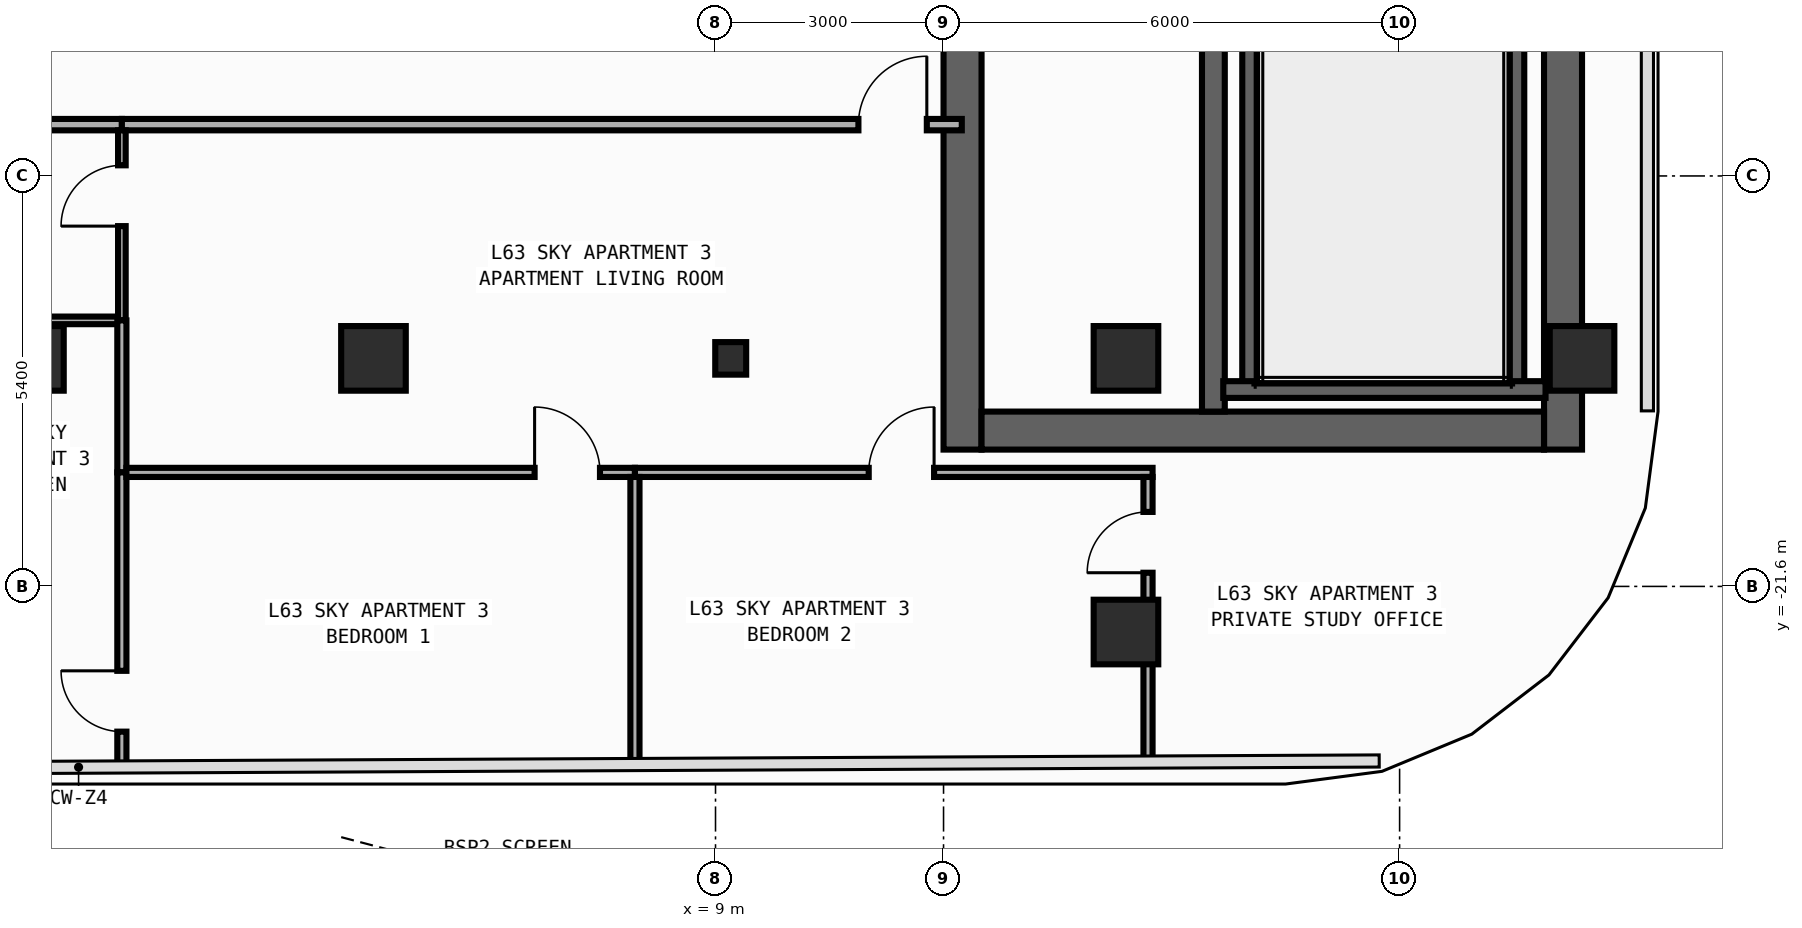
"""IFC4 building model, lengths in metres.
Left out: names, types, materials, properties, quantities, classifications, styles, units other than length and angle.
Written with IfcOpenShell. Run it as: python <this file> out.ifc"""

import sys

from ifc_helpers import new_model, si_unit, direction, frame, frame_2d, origin, origin_2d, place, context, subcontext, project, spatial, rectangle, i_section, extrude, element, fill, save


model = new_model("IFC4")
c1 = context("Model", 3, precision=1e-05, world=origin(), true_north=direction((0.0, 1.0)))
c2 = subcontext(c1, "Body", "Model", "MODEL_VIEW")
j1 = project(units=[si_unit("LENGTHUNIT", "METRE"), si_unit("PLANEANGLEUNIT", "RADIAN")], contexts=[c1])
p1 = place(None, origin())
s1 = spatial("IfcSite", under=j1, at=p1, CompositionType="ELEMENT")
p2 = place(p1, origin())
s2 = spatial("IfcBuilding", under=s1, at=p2, CompositionType="ELEMENT")
p3 = place(p2, frame((0.0, 0.0, 265.6)))
s3 = spatial("IfcBuildingStorey", under=s2, at=p3, CompositionType="ELEMENT", Elevation=265.6)
p4 = place(p3, frame((12.25, -19.8, 0.0), z_axis=(0.0, 0.0, 1.0), x_axis=(0.0, 1.0, 0.0)))
e1 = element("IfcWall", 1, at=p4, inside=s3, PredefinedType="SHEAR", context=c2, shape_type="SweptSolid", body=[
    extrude(rectangle(XDim=27.0, YDim=0.5, at=frame_2d((13.5, 0.0))), origin(), (0.0, 0.0, 1.0), 3.34),
])
p5 = place(p4, frame((23.05, 0.0, 0.0)))
e2 = element("IfcOpeningElement", 2, at=p5, cuts=e1, PredefinedType="OPENING", context=c2, shape_type="SweptSolid", body=[
    extrude(rectangle(XDim=1.1, YDim=2.2, at=frame_2d((0.55, 1.1))), frame((0.0, 0.26, 0.0), z_axis=(0.0, -1.0, 0.0), x_axis=(1.0, 0.0, 0.0)), (0.0, 0.0, 1.0), 0.52),
])
p6 = place(p4, frame((19.85, 0.0, 0.0)))
e3 = element("IfcOpeningElement", 3, at=p6, cuts=e1, PredefinedType="OPENING", context=c2, shape_type="SweptSolid", body=[
    extrude(rectangle(XDim=1.1, YDim=2.2, at=frame_2d((0.55, 1.1))), frame((0.0, 0.26, 0.0), z_axis=(0.0, -1.0, 0.0), x_axis=(1.0, 0.0, 0.0)), (0.0, 0.0, 1.0), 0.52),
])
p7 = place(p4, frame((16.65, 0.0, 0.0)))
e4 = element("IfcOpeningElement", 4, at=p7, cuts=e1, PredefinedType="OPENING", context=c2, shape_type="SweptSolid", body=[
    extrude(rectangle(XDim=1.1, YDim=2.2, at=frame_2d((0.55, 1.1))), frame((0.0, 0.26, 0.0), z_axis=(0.0, -1.0, 0.0), x_axis=(1.0, 0.0, 0.0)), (0.0, 0.0, 1.0), 0.52),
])
p8 = place(p4, frame((10.175, 0.0, 0.0)))
e5 = element("IfcOpeningElement", 5, at=p8, cuts=e1, PredefinedType="OPENING", context=c2, shape_type="SweptSolid", body=[
    extrude(rectangle(XDim=0.85, YDim=2.1, at=frame_2d((0.425, 1.05))), frame((0.0, 0.26, 0.0), z_axis=(0.0, -1.0, 0.0), x_axis=(1.0, 0.0, 0.0)), (0.0, 0.0, 1.0), 0.52),
])
p9 = place(p4, frame((12.725, 0.0, 0.0)))
e6 = element("IfcOpeningElement", 6, at=p9, cuts=e1, PredefinedType="OPENING", context=c2, shape_type="SweptSolid", body=[
    extrude(rectangle(XDim=1.15, YDim=2.2, at=frame_2d((0.575, 1.1))), frame((0.0, 0.26, 0.0), z_axis=(0.0, -1.0, 0.0), x_axis=(1.0, 0.0, 0.0)), (0.0, 0.0, 1.0), 0.52),
])
p10 = place(p4, frame((25.125, 0.0, 0.0)))
e7 = element("IfcOpeningElement", 7, at=p10, cuts=e1, PredefinedType="OPENING", context=c2, shape_type="SweptSolid", body=[
    extrude(rectangle(XDim=0.85, YDim=2.1, at=frame_2d((0.425, 1.05))), frame((0.0, 0.26, 0.0), z_axis=(0.0, -1.0, 0.0), x_axis=(1.0, 0.0, 0.0)), (0.0, 0.0, 1.0), 0.52),
])
p11 = place(p3, frame((20.15, -19.8, 0.0), z_axis=(0.0, 0.0, 1.0), x_axis=(0.0, 1.0, 0.0)))
e8 = element("IfcWall", 8, at=p11, inside=s3, PredefinedType="SHEAR", context=c2, shape_type="SweptSolid", body=[
    extrude(rectangle(XDim=27.0, YDim=0.5, at=frame_2d((13.5, 0.0))), origin(), (0.0, 0.0, 1.0), 3.34),
])
p12 = place(p3, frame((12.5, -19.55, 0.0), z_axis=(0.0, 0.0, 1.0), x_axis=(1.0, 0.0, 0.0)))
e9 = element("IfcWall", 9, at=p12, inside=s3, PredefinedType="SHEAR", context=c2, shape_type="SweptSolid", body=[
    extrude(rectangle(XDim=7.4, YDim=0.5, at=frame_2d((3.7, 0.0))), origin(), (0.0, 0.0, 1.0), 3.34),
])
p13 = place(p3, frame((15.55, -19.3, 0.0), z_axis=(0.0, 0.0, 1.0), x_axis=(0.0, 1.0, 0.0)))
e10 = element("IfcWall", 10, at=p13, inside=s3, PredefinedType="SHEAR", context=c2, shape_type="SweptSolid", body=[
    extrude(rectangle(XDim=26.0, YDim=0.3, at=frame_2d((13.0, 0.0))), origin(), (0.0, 0.0, 1.0), 3.34),
])
p14 = place(p13, frame((12.225, 0.0, 0.0)))
e11 = element("IfcOpeningElement", 11, at=p14, cuts=e10, PredefinedType="OPENING", context=c2, shape_type="SweptSolid", body=[
    extrude(rectangle(XDim=1.15, YDim=2.2, at=frame_2d((0.575, 1.1))), frame((0.0, 0.16, 0.0), z_axis=(0.0, -1.0, 0.0), x_axis=(1.0, 0.0, 0.0)), (0.0, 0.0, 1.0), 0.32),
])
p15 = place(p13, frame((24.625, 0.0, 0.0)))
e12 = element("IfcOpeningElement", 12, at=p15, cuts=e10, PredefinedType="OPENING", context=c2, shape_type="SweptSolid", body=[
    extrude(rectangle(XDim=0.85, YDim=2.1, at=frame_2d((0.425, 1.05))), frame((0.0, 0.16, 0.0), z_axis=(0.0, -1.0, 0.0), x_axis=(1.0, 0.0, 0.0)), (0.0, 0.0, 1.0), 0.32),
])
for number, where, z_axis, x_axis in (
    (13, (16.04, -19.01, 0.0), (0.0, 0.0, 1.0), (0.0, 1.0, 0.0)),
    (14, (19.53, -19.01, 0.0), (0.0, 0.0, 1.0), (0.0, 1.0, 0.0)),
):
    element("IfcWall", number, at=place(p3, frame(where, z_axis=z_axis, x_axis=x_axis)), inside=s3, PredefinedType="SHEAR", context=c2, shape_type="SweptSolid", body=[
        extrude(rectangle(XDim=11.42, YDim=0.22, at=frame_2d((5.71, 0.0))), origin(), (0.0, 0.0, 1.0), 3.34),
    ])
p16 = place(p3, frame((15.68, -19.01, 0.0), z_axis=(0.0, 0.0, 1.0), x_axis=(1.0, 0.0, 0.0)))
e15 = element("IfcWall", 15, at=p16, inside=s3, PredefinedType="SHEAR", context=c2, shape_type="SweptSolid", body=[
    extrude(rectangle(XDim=4.24, YDim=0.22, at=frame_2d((2.12, 0.0))), origin(), (0.0, 0.0, 1.0), 3.34),
])
p17 = place(p3, frame((9.2, -18.6, 0.0), z_axis=(0.0, 0.0, 1.0), x_axis=(1.0, 0.0, 0.0)))
e16 = element("IfcColumn", 16, at=p17, inside=s3, PredefinedType="COLUMN", context=c2, shape_type="SweptSolid", body=[
    extrude(i_section(OverallWidth=0.407, OverallDepth=0.428, WebThickness=0.02, FlangeThickness=0.035, FilletRadius=0.022, at=origin_2d()), origin(), (0.0, 0.0, 1.0), 3.6),
])
for number, where, z_axis, x_axis in (
    (17, (20.4, -18.6, 0.0), (0.0, 0.0, 1.0), (1.0, 0.0, 0.0)),
    (18, (14.4, -18.6, 0.0), (0.0, 0.0, 1.0), (1.0, 0.0, 0.0)),
    (19, (0.0, -18.6, 0.0), (0.0, 0.0, 1.0), (1.0, 0.0, 0.0)),
    (20, (4.5, -18.6, 0.0), (0.0, 0.0, 1.0), (1.0, 0.0, 0.0)),
    (21, (14.4, -22.2, 0.0), (0.0, 0.0, 1.0), (1.0, 0.0, 0.0)),
):
    element("IfcColumn", number, at=place(p3, frame(where, z_axis=z_axis, x_axis=x_axis)), inside=s3, PredefinedType="COLUMN", context=c2, shape_type="SweptSolid", body=[
        extrude(rectangle(XDim=0.85, YDim=0.85, at=origin_2d()), origin(), (0.0, 0.0, 1.0), 3.6),
    ])
p18 = place(p3, frame((-1.4, -15.525, 0.0), z_axis=(0.0, 0.0, 1.0), x_axis=(1.0, 0.0, 0.0)))
e22 = element("IfcWall", 22, at=p18, inside=s3, PredefinedType="PARTITIONING", context=c2, shape_type="SweptSolid", body=[
    extrude(rectangle(XDim=2.59, YDim=0.15, at=frame_2d((1.295, 0.0))), origin(), (0.0, 0.0, 1.0), 3.34),
])
p19 = place(p3, frame((1.19, -15.525, 0.0), z_axis=(0.0, 0.0, 1.0), x_axis=(1.0, 0.0, 0.0)))
e23 = element("IfcWall", 23, at=p19, inside=s3, PredefinedType="PARTITIONING", context=c2, shape_type="SweptSolid", body=[
    extrude(rectangle(XDim=11.05, YDim=0.15, at=frame_2d((5.525, 0.0))), origin(), (0.0, 0.0, 1.0), 3.34),
])
p20 = place(p19, frame((9.69, 0.0, 0.0)))
e24 = element("IfcOpeningElement", 24, at=p20, cuts=e23, PredefinedType="OPENING", context=c2, shape_type="SweptSolid", body=[
    extrude(rectangle(XDim=0.9, YDim=2.15, at=frame_2d((0.45, 1.075))), frame((0.0, 0.085, 0.0), z_axis=(0.0, -1.0, 0.0), x_axis=(1.0, 0.0, 0.0)), (0.0, 0.0, 1.0), 0.17),
])
p21 = place(p3, frame((-1.33, -18.1, 0.0), z_axis=(0.0, 0.0, 1.0), x_axis=(1.0, 0.0, 0.0)))
e25 = element("IfcWall", 25, at=p21, inside=s3, PredefinedType="PARTITIONING", context=c2, shape_type="SweptSolid", body=[
    extrude(rectangle(XDim=2.47, YDim=0.1, at=frame_2d((1.235, 0.0))), origin(), (0.0, 0.0, 1.0), 3.34),
])
p22 = place(p3, frame((1.19, -18.1, 0.0), z_axis=(0.0, 0.0, 1.0), x_axis=(0.0, 1.0, 0.0)))
e26 = element("IfcWall", 26, at=p22, inside=s3, PredefinedType="PARTITIONING", context=c2, shape_type="SweptSolid", body=[
    extrude(rectangle(XDim=2.5, YDim=0.1, at=frame_2d((1.25, 0.0))), origin(), (0.0, 0.0, 1.0), 3.34),
])
p23 = place(p22, frame((1.24, 0.0, 0.0)))
e27 = element("IfcOpeningElement", 27, at=p23, cuts=e26, PredefinedType="OPENING", context=c2, shape_type="SweptSolid", body=[
    extrude(rectangle(XDim=0.8, YDim=2.1, at=frame_2d((0.4, 1.05))), frame((0.0, 0.06, 0.0), z_axis=(0.0, -1.0, 0.0), x_axis=(1.0, 0.0, 0.0)), (0.0, 0.0, 1.0), 0.12),
])
p24 = place(p3, frame((1.19, -20.1, 0.0), z_axis=(0.0, 0.0, 1.0), x_axis=(0.0, 1.0, 0.0)))
e28 = element("IfcWall", 28, at=p24, inside=s3, PredefinedType="PARTITIONING", context=c2, shape_type="SweptSolid", body=[
    extrude(rectangle(XDim=2.0, YDim=0.12, at=frame_2d((1.0, 0.0))), origin(), (0.0, 0.0, 1.0), 3.34),
])
p25 = place(p3, frame((1.19, -23.971, 0.0), z_axis=(0.0, 0.0, 1.0), x_axis=(0.0, 1.0, 0.0)))
e29 = element("IfcWall", 29, at=p25, inside=s3, PredefinedType="PARTITIONING", context=c2, shape_type="SweptSolid", body=[
    extrude(rectangle(XDim=3.871, YDim=0.12, at=frame_2d((1.935, 0.0))), origin(), (0.0, 0.0, 1.0), 3.34),
])
p26 = place(p25, frame((0.46, 0.0, 0.0)))
e30 = element("IfcOpeningElement", 30, at=p26, cuts=e29, PredefinedType="OPENING", context=c2, shape_type="SweptSolid", body=[
    extrude(rectangle(XDim=0.8, YDim=2.1, at=frame_2d((0.4, 1.05))), frame((0.0, 0.07, 0.0), z_axis=(0.0, -1.0, 0.0), x_axis=(1.0, 0.0, 0.0)), (0.0, 0.0, 1.0), 0.14),
])
p27 = place(p3, frame((1.25, -20.1, 0.0), z_axis=(0.0, 0.0, 1.0), x_axis=(1.0, 0.0, 0.0)))
e31 = element("IfcWall", 31, at=p27, inside=s3, PredefinedType="PARTITIONING", context=c2, shape_type="SweptSolid", body=[
    extrude(rectangle(XDim=6.69, YDim=0.12, at=frame_2d((3.345, 0.0))), origin(), (0.0, 0.0, 1.0), 3.34),
])
p28 = place(p27, frame((5.37, 0.0, 0.0)))
e32 = element("IfcOpeningElement", 32, at=p28, cuts=e31, PredefinedType="OPENING", context=c2, shape_type="SweptSolid", body=[
    extrude(rectangle(XDim=0.86, YDim=2.15, at=frame_2d((0.43, 1.075))), frame((0.0, 0.07, 0.0), z_axis=(0.0, -1.0, 0.0), x_axis=(1.0, 0.0, 0.0)), (0.0, 0.0, 1.0), 0.14),
])
p29 = place(p3, frame((7.94, -20.1, 0.0), z_axis=(0.0, 0.0, 1.0), x_axis=(1.0, 0.0, 0.0)))
e33 = element("IfcWall", 33, at=p29, inside=s3, PredefinedType="PARTITIONING", context=c2, shape_type="SweptSolid", body=[
    extrude(rectangle(XDim=6.81, YDim=0.12, at=frame_2d((3.405, 0.0))), origin(), (0.0, 0.0, 1.0), 3.34),
])
p30 = place(p29, frame((3.076, 0.0, 0.0)))
e34 = element("IfcOpeningElement", 34, at=p30, cuts=e33, PredefinedType="OPENING", context=c2, shape_type="SweptSolid", body=[
    extrude(rectangle(XDim=0.86, YDim=2.15, at=frame_2d((0.43, 1.075))), frame((0.0, 0.07, 0.0), z_axis=(0.0, -1.0, 0.0), x_axis=(1.0, 0.0, 0.0)), (0.0, 0.0, 1.0), 0.14),
])
p31 = place(p3, frame((14.69, -23.906, 0.0), z_axis=(0.0, 0.0, 1.0), x_axis=(0.0, 1.0, 0.0)))
e35 = element("IfcWall", 35, at=p31, inside=s3, PredefinedType="PARTITIONING", context=c2, shape_type="SweptSolid", body=[
    extrude(rectangle(XDim=3.746, YDim=0.12, at=frame_2d((1.873, 0.0))), origin(), (0.0, 0.0, 1.0), 2.44),
])
p32 = place(p31, frame((2.486, 0.0, 0.0)))
e36 = element("IfcOpeningElement", 36, at=p32, cuts=e35, PredefinedType="OPENING", context=c2, shape_type="SweptSolid", body=[
    extrude(rectangle(XDim=0.8, YDim=2.1, at=frame_2d((0.4, 1.05))), frame((0.0, 0.07, 0.0), z_axis=(0.0, -1.0, 0.0), x_axis=(1.0, 0.0, 0.0)), (0.0, 0.0, 1.0), 0.14),
])
p33 = place(p3, frame((7.94, -23.938, 0.0), z_axis=(0.0, 0.0, 1.0), x_axis=(0.0, 1.0, 0.0)))
e37 = element("IfcWall", 37, at=p33, inside=s3, PredefinedType="PARTITIONING", context=c2, shape_type="SweptSolid", body=[
    extrude(rectangle(XDim=3.779, YDim=0.12, at=frame_2d((1.889, 0.0))), origin(), (0.0, 0.0, 1.0), 3.34),
])
p34 = place(p20, origin())
e38 = element("IfcDoor", 38, at=p34, inside=s3, OperationType="SINGLE_SWING_RIGHT", PredefinedType="DOOR", context=c2, shape_type="SweptSolid", body=[
    extrude(rectangle(XDim=0.9, YDim=2.15, at=frame_2d((0.45, 1.075))), frame((0.0, 0.025, 0.0), z_axis=(0.0, -1.0, 0.0), x_axis=(1.0, 0.0, 0.0)), (0.0, 0.0, 1.0), 0.05),
])
fill(e24, e38)
p35 = place(p23, origin())
e39 = element("IfcDoor", 39, at=p35, inside=s3, OperationType="SINGLE_SWING_LEFT", PredefinedType="DOOR", context=c2, shape_type="SweptSolid", body=[
    extrude(rectangle(XDim=0.8, YDim=2.1, at=frame_2d((0.4, 1.05))), frame((0.0, 0.025, 0.0), z_axis=(0.0, -1.0, 0.0), x_axis=(1.0, 0.0, 0.0)), (0.0, 0.0, 1.0), 0.05),
])
fill(e27, e39)
p36 = place(p28, origin())
e40 = element("IfcDoor", 40, at=p36, inside=s3, OperationType="SINGLE_SWING_LEFT", PredefinedType="DOOR", context=c2, shape_type="SweptSolid", body=[
    extrude(rectangle(XDim=0.86, YDim=2.15, at=frame_2d((0.43, 1.075))), frame((0.0, 0.025, 0.0), z_axis=(0.0, -1.0, 0.0), x_axis=(1.0, 0.0, 0.0)), (0.0, 0.0, 1.0), 0.05),
])
fill(e32, e40)
p37 = place(p30, origin())
e41 = element("IfcDoor", 41, at=p37, inside=s3, OperationType="SINGLE_SWING_RIGHT", PredefinedType="DOOR", context=c2, shape_type="SweptSolid", body=[
    extrude(rectangle(XDim=0.86, YDim=2.15, at=frame_2d((0.43, 1.075))), frame((0.0, 0.025, 0.0), z_axis=(0.0, -1.0, 0.0), x_axis=(1.0, 0.0, 0.0)), (0.0, 0.0, 1.0), 0.05),
])
fill(e34, e41)
p38 = place(p26, origin())
e42 = element("IfcDoor", 42, at=p38, inside=s3, OperationType="SINGLE_SWING_RIGHT", PredefinedType="DOOR", context=c2, shape_type="SweptSolid", body=[
    extrude(rectangle(XDim=0.8, YDim=2.1, at=frame_2d((0.4, 1.05))), frame((0.0, 0.025, 0.0), z_axis=(0.0, -1.0, 0.0), x_axis=(1.0, 0.0, 0.0)), (0.0, 0.0, 1.0), 0.05),
])
fill(e30, e42)
p39 = place(p32, origin())
e43 = element("IfcDoor", 43, at=p39, inside=s3, OperationType="SINGLE_SWING_LEFT", PredefinedType="DOOR", context=c2, shape_type="SweptSolid", body=[
    extrude(rectangle(XDim=0.8, YDim=2.1, at=frame_2d((0.4, 1.05))), frame((0.0, 0.025, 0.0), z_axis=(0.0, -1.0, 0.0), x_axis=(1.0, 0.0, 0.0)), (0.0, 0.0, 1.0), 0.05),
])
fill(e36, e43)
save(model, sys.argv[1])
